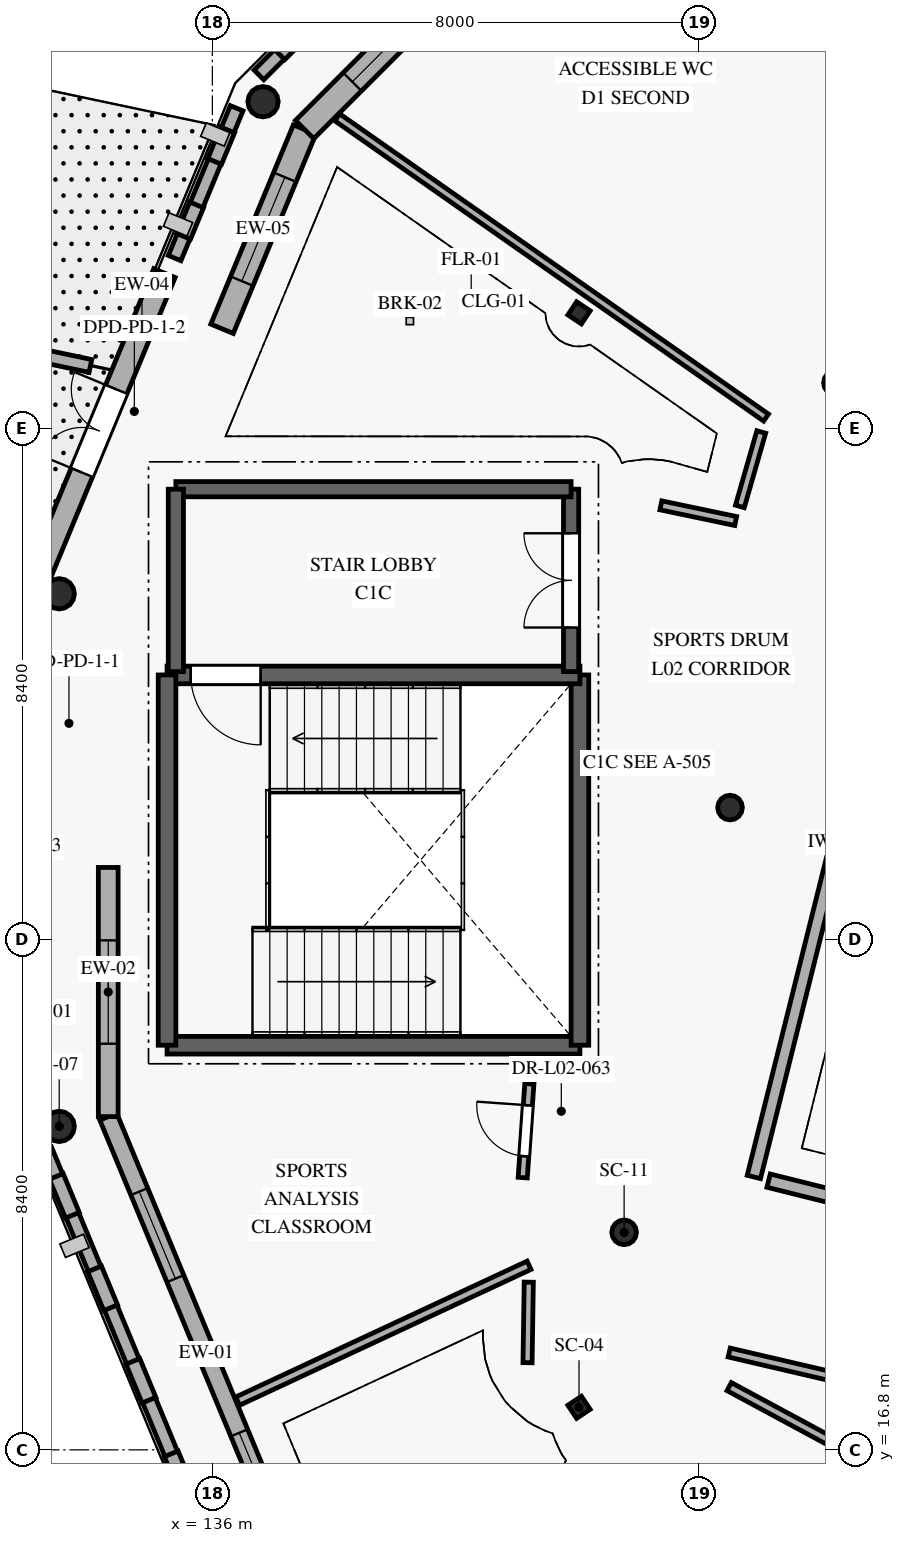
"""IFC4 building model, lengths in metres.
Left out: names, types, materials, properties, quantities, classifications, styles, units other than length and angle.
Written with IfcOpenShell. Run it as: python <this file> out.ifc"""

import sys

from ifc_helpers import new_model, si_unit, direction, frame, frame_2d, origin, origin_2d, place, context, subcontext, project, spatial, rectangle, circle, hollow_circle, i_section, extrude, element, fill, save


model = new_model("IFC4")
c1 = context("Model", 3, precision=1e-05, world=origin(), true_north=direction((0.0, 1.0)))
c2 = subcontext(c1, "Body", "Model", "MODEL_VIEW")
j1 = project(units=[si_unit("LENGTHUNIT", "METRE"), si_unit("PLANEANGLEUNIT", "RADIAN")], contexts=[c1])
p1 = place(None, origin())
s1 = spatial("IfcSite", under=j1, at=p1, CompositionType="ELEMENT")
p2 = place(p1, origin())
s2 = spatial("IfcBuilding", under=s1, at=p2, CompositionType="ELEMENT")
p3 = place(p2, frame((0.0, 0.0, 8.4)))
s3 = spatial("IfcBuildingStorey", under=s2, at=p3, CompositionType="ELEMENT", Elevation=8.4)
for number, where, z_axis, x_axis in (
    (1, (142.772, 20.377, 0.0), (0.0, 0.0, 1.0), (0.97, -0.242, 0.0)),
    (2, (144.514, 27.364, 0.0), (0.0, 0.0, 1.0), (0.97, -0.242, 0.0)),
    (3, (146.256, 34.35, 0.0), (0.0, 0.0, 1.0), (0.97, -0.242, 0.0)),
):
    element("IfcColumn", number, at=place(p3, frame(where, z_axis=z_axis, x_axis=x_axis)), inside=s3, PredefinedType="COLUMN", context=c2, shape_type="SweptSolid", body=[
        extrude(hollow_circle(Radius=0.203, WallThickness=0.016, at=origin_2d()), origin(), (0.0, 0.0, 1.0), 4.2),
    ])
for number, where, z_axis, x_axis in (
    (4, (136.833, 38.973, 0.0), (0.0, 0.0, 1.0), (-0.556, -0.831, 0.0)),
    (5, (133.481, 30.88, 0.0), (0.0, 0.0, 1.0), (-0.195, -0.981, 0.0)),
    (6, (133.481, 22.12, 0.0), (0.0, 0.0, 1.0), (0.195, -0.981, 0.0)),
):
    element("IfcColumn", number, at=place(p3, frame(where, z_axis=z_axis, x_axis=x_axis)), inside=s3, PredefinedType="COLUMN", context=c2, shape_type="SweptSolid", body=[
        extrude(circle(Radius=0.25, at=origin_2d()), origin(), (0.0, 0.0, 1.0), 4.2),
    ])
for number, where, z_axis, x_axis in (
    (7, (142.03, 35.5, 0.0), (0.0, 0.0, 1.0), (-0.556, -0.831, 0.0)),
    (8, (142.03, 17.5, 0.0), (0.0, 0.0, 1.0), (0.556, -0.831, 0.0)),
):
    element("IfcColumn", number, at=place(p3, frame(where, z_axis=z_axis, x_axis=x_axis)), inside=s3, PredefinedType="COLUMN", context=c2, shape_type="SweptSolid", body=[
        extrude(i_section(OverallWidth=0.259, OverallDepth=0.267, WebThickness=0.013, FlangeThickness=0.021, FilletRadius=0.013, at=origin_2d()), origin(), (0.0, 0.0, 1.0), 4.2),
    ])
p4 = place(p3, frame((137.517, 14.484, 0.0), z_axis=(0.0, 0.0, 1.0), x_axis=(-0.382671186453, 0.923884604839, 0.0)))
e9 = element("IfcWall", 9, at=p4, inside=s3, PredefinedType="SOLIDWALL", context=c2, shape_type="SweptSolid", body=[
    extrude(rectangle(XDim=8.439, YDim=0.3, at=frame_2d((4.219, 0.0))), origin(), (0.0, 0.0, 1.0), 3.94),
])
p5 = place(p4, frame((1.41, 0.0, 0.85)))
e10 = element("IfcOpeningElement", 10, at=p5, cuts=e9, PredefinedType="OPENING", context=c2, shape_type="SweptSolid", body=[
    extrude(rectangle(XDim=1.4, YDim=1.4, at=frame_2d((0.7, 0.7))), frame((0.0, 0.16, 0.0), z_axis=(0.0, -1.0, 0.0), x_axis=(1.0, 0.0, 0.0)), (0.0, 0.0, 1.0), 0.32),
])
p6 = place(p4, frame((5.554, 0.0, 0.85)))
e11 = element("IfcOpeningElement", 11, at=p6, cuts=e9, PredefinedType="OPENING", context=c2, shape_type="SweptSolid", body=[
    extrude(rectangle(XDim=1.55, YDim=1.4, at=frame_2d((0.775, 0.7))), frame((0.0, 0.16, 0.0), z_axis=(0.0, -1.0, 0.0), x_axis=(1.0, 0.0, 0.0)), (0.0, 0.0, 1.0), 0.32),
])
p7 = place(p3, frame((134.288, 22.281, 0.0), z_axis=(0.0, 0.0, 1.0), x_axis=(0.0, 1.0, 0.0)))
e12 = element("IfcWall", 12, at=p7, inside=s3, PredefinedType="SOLIDWALL", context=c2, shape_type="SweptSolid", body=[
    extrude(rectangle(XDim=4.098, YDim=0.325, at=frame_2d((2.049, 0.0))), origin(), (0.0, 0.0, 1.0), 3.94),
])
p8 = place(p7, frame((1.199, 0.0, 0.85)))
e13 = element("IfcOpeningElement", 13, at=p8, cuts=e12, PredefinedType="OPENING", context=c2, shape_type="SweptSolid", body=[
    extrude(rectangle(XDim=1.7, YDim=1.4, at=frame_2d((0.85, 0.7))), frame((0.0, 0.172, 0.0), z_axis=(0.0, -1.0, 0.0), x_axis=(1.0, 0.0, 0.0)), (0.0, 0.0, 1.0), 0.345),
])
p9 = place(p3, frame((133.062, 30.963, 0.0), z_axis=(0.0, 0.0, 1.0), x_axis=(0.382652384315, 0.923892392424, 0.0)))
e14 = element("IfcWall", 14, at=p9, inside=s3, PredefinedType="SOLIDWALL", context=c2, shape_type="SweptSolid", body=[
    extrude(rectangle(XDim=5.619, YDim=0.38, at=frame_2d((2.81, 0.0))), origin(), (0.0, 0.0, 1.0), 3.94),
])
p10 = place(p9, frame((2.07, 0.0, 0.0)))
e15 = element("IfcOpeningElement", 15, at=p10, cuts=e14, PredefinedType="OPENING", context=c2, shape_type="SweptSolid", body=[
    extrude(rectangle(XDim=1.48, YDim=2.12, at=frame_2d((0.74, 1.06))), frame((0.0, 0.2, 0.0), z_axis=(0.0, -1.0, 0.0), x_axis=(1.0, 0.0, 0.0)), (0.0, 0.0, 1.0), 0.4),
])
p11 = place(p3, frame((136.16, 35.238, 0.0), z_axis=(0.0, 0.0, 1.0), x_axis=(0.382635436082, 0.923899411762, 0.0)))
e16 = element("IfcWall", 16, at=p11, inside=s3, PredefinedType="SOLIDWALL", context=c2, shape_type="SweptSolid", body=[
    extrude(rectangle(XDim=3.548, YDim=0.4, at=frame_2d((1.774, 0.0))), origin(), (0.0, 0.0, 1.0), 3.94),
])
p12 = place(p11, frame((0.849, 0.0, 0.85)))
e17 = element("IfcOpeningElement", 17, at=p12, cuts=e16, PredefinedType="OPENING", context=c2, shape_type="SweptSolid", body=[
    extrude(rectangle(XDim=1.85, YDim=1.4, at=frame_2d((0.925, 0.7))), frame((0.0, 0.21, 0.0), z_axis=(0.0, -1.0, 0.0), x_axis=(1.0, 0.0, 0.0)), (0.0, 0.0, 1.0), 0.42),
])
p13 = place(p3, frame((137.517, 38.516, 0.0), z_axis=(0.0, 0.0, 1.0), x_axis=(0.707106781187, 0.707106781187, 0.0)))
e18 = element("IfcWall", 18, at=p13, inside=s3, PredefinedType="SOLIDWALL", context=c2, shape_type="SweptSolid", body=[
    extrude(rectangle(XDim=8.439, YDim=0.425, at=frame_2d((4.219, 0.0))), origin(), (0.0, 0.0, 1.0), 3.94),
])
p14 = place(p13, frame((1.11, 0.0, 0.85)))
e19 = element("IfcOpeningElement", 19, at=p14, cuts=e18, PredefinedType="OPENING", context=c2, shape_type="SweptSolid", body=[
    extrude(rectangle(XDim=2.0, YDim=1.4, at=frame_2d((1.0, 0.7))), frame((0.0, 0.222, 0.0), z_axis=(0.0, -1.0, 0.0), x_axis=(1.0, 0.0, 0.0)), (0.0, 0.0, 1.0), 0.445),
])
p15 = place(p13, frame((5.254, 0.0, 0.85)))
e20 = element("IfcOpeningElement", 20, at=p15, cuts=e18, PredefinedType="OPENING", context=c2, shape_type="SweptSolid", body=[
    extrude(rectangle(XDim=2.15, YDim=1.4, at=frame_2d((1.075, 0.7))), frame((0.0, 0.222, 0.0), z_axis=(0.0, -1.0, 0.0), x_axis=(1.0, 0.0, 0.0)), (0.0, 0.0, 1.0), 0.445),
])
p16 = place(p3, frame((142.585, 45.233, 0.0), z_axis=(0.0, 0.0, 1.0), x_axis=(-0.707106781187, -0.707106781187, 0.0)))
e21 = element("IfcWall", 21, at=p16, inside=s3, PredefinedType="ELEMENTEDWALL", context=c2, shape_type="SweptSolid", body=[
    extrude(rectangle(XDim=8.229, YDim=0.225, at=frame_2d((4.115, 0.0))), origin(), (0.0, 0.0, 1.0), 1.09),
])
p17 = place(p3, frame((137.593, 40.24, 1.09), z_axis=(0.0, 0.0, 1.0), x_axis=(-0.707283403329, -0.706930114916, 0.0)))
e22 = element("IfcWall", 22, at=p17, inside=s3, PredefinedType="ELEMENTEDWALL", context=c2, shape_type="SweptSolid", body=[
    extrude(rectangle(XDim=0.691, YDim=0.245, at=frame_2d((0.346, 0.0))), origin(), (0.0, 0.0, 1.0), 2.85),
])
p18 = place(p3, frame((136.4, 38.865, 0.0), z_axis=(0.0, 0.0, 1.0), x_axis=(-0.382691233326, -0.923876301209, 0.0)))
e23 = element("IfcWall", 23, at=p18, inside=s3, PredefinedType="ELEMENTEDWALL", context=c2, shape_type="SweptSolid", body=[
    extrude(rectangle(XDim=2.668, YDim=0.225, at=frame_2d((1.334, 0.0))), origin(), (0.0, 0.0, 1.0), 1.09),
])
p19 = place(p3, frame((136.252, 38.508, 1.09), z_axis=(0.0, 0.0, 1.0), x_axis=(-0.382634050621, -0.923899985553, 0.0)))
e24 = element("IfcWall", 24, at=p19, inside=s3, PredefinedType="ELEMENTEDWALL", context=c2, shape_type="SweptSolid", body=[
    extrude(rectangle(XDim=0.56, YDim=0.245, at=frame_2d((0.28, 0.0))), origin(), (0.0, 0.0, 1.0), 2.85),
])
p20 = place(p3, frame((135.741, 37.276, 1.09), z_axis=(0.0, 0.0, 1.0), x_axis=(-0.382788170111, -0.92383614176, 0.0)))
e25 = element("IfcWall", 25, at=p20, inside=s3, PredefinedType="ELEMENTEDWALL", context=c2, shape_type="SweptSolid", body=[
    extrude(rectangle(XDim=0.56, YDim=0.245, at=frame_2d((0.28, 0.0))), origin(), (0.0, 0.0, 1.0), 2.85),
])
p21 = place(p3, frame((133.251, 21.738, 0.0), z_axis=(0.0, 0.0, 1.0), x_axis=(0.382687155267, -0.923877990426, 0.0)))
e26 = element("IfcWall", 26, at=p21, inside=s3, PredefinedType="ELEMENTEDWALL", context=c2, shape_type="SweptSolid", body=[
    extrude(rectangle(XDim=8.23, YDim=0.225, at=frame_2d((4.115, 0.0))), origin(), (0.0, 0.0, 1.0), 1.09),
])
p22 = place(p3, frame((133.433, 21.297, 1.09), z_axis=(0.0, 0.0, 1.0), x_axis=(0.382934147939, -0.92377564286, 0.0)))
e27 = element("IfcWall", 27, at=p22, inside=s3, PredefinedType="ELEMENTEDWALL", context=c2, shape_type="SweptSolid", body=[
    extrude(rectangle(XDim=0.691, YDim=0.245, at=frame_2d((0.346, 0.0))), origin(), (0.0, 0.0, 1.0), 2.85),
])
p23 = place(p3, frame((134.063, 19.776, 1.09), z_axis=(0.0, 0.0, 1.0), x_axis=(0.382757564877, -0.923848822335, 0.0)))
e28 = element("IfcWall", 28, at=p23, inside=s3, PredefinedType="ELEMENTEDWALL", context=c2, shape_type="SweptSolid", body=[
    extrude(rectangle(XDim=0.691, YDim=0.245, at=frame_2d((0.345, 0.0))), origin(), (0.0, 0.0, 1.0), 2.85),
])
for number, where, z_axis, x_axis in (
    (29, (134.693, 18.255, 1.09), (0.0, 0.0, 1.0), (0.383, -0.924, 0.0)),
    (30, (135.323, 16.735, 1.09), (0.0, 0.0, 1.0), (0.383, -0.924, 0.0)),
):
    element("IfcWall", number, at=place(p3, frame(where, z_axis=z_axis, x_axis=x_axis)), inside=s3, PredefinedType="ELEMENTEDWALL", context=c2, shape_type="SweptSolid", body=[
        extrude(rectangle(XDim=0.691, YDim=0.245, at=frame_2d((0.345, 0.0))), origin(), (0.0, 0.0, 1.0), 2.85),
    ])
p24 = place(p3, frame((133.995, 34.627, 0.0), z_axis=(0.0, 0.0, 1.0), x_axis=(-0.978349703119, 0.206958591044, 0.0)))
e31 = element("IfcWall", 31, at=p24, inside=s3, PredefinedType="PARAPET", context=c2, shape_type="SweptSolid", body=[
    extrude(rectangle(XDim=30.429, YDim=0.215, at=frame_2d((15.215, 0.0))), origin(), (0.0, 0.0, 1.0), 1.15),
])
p25 = place(p3, frame((135.255, 23.455, 0.0), z_axis=(0.0, 0.0, 1.0), x_axis=(1.0, 0.0, 0.0)))
e32 = element("IfcWall", 32, at=p25, inside=s3, PredefinedType="SHEAR", context=c2, shape_type="SweptSolid", body=[
    extrude(rectangle(XDim=6.79, YDim=0.29, at=frame_2d((3.395, 0.0))), origin(), (0.0, 0.0, 1.0), 3.95),
])
p26 = place(p3, frame((142.045, 23.455, 0.0), z_axis=(0.0, 0.0, 1.0), x_axis=(0.0, 1.0, 0.0)))
e33 = element("IfcWall", 33, at=p26, inside=s3, PredefinedType="SHEAR", context=c2, shape_type="SweptSolid", body=[
    extrude(rectangle(XDim=6.09, YDim=0.29, at=frame_2d((3.045, 0.0))), origin(), (0.0, 0.0, 1.0), 3.95),
])
p27 = place(p3, frame((142.045, 29.545, 0.0), z_axis=(0.0, 0.0, 1.0), x_axis=(-1.0, 0.0, 0.0)))
e34 = element("IfcWall", 34, at=p27, inside=s3, PredefinedType="SHEAR", context=c2, shape_type="SweptSolid", body=[
    extrude(rectangle(XDim=6.79, YDim=0.29, at=frame_2d((3.395, 0.0))), origin(), (0.0, 0.0, 1.0), 3.95),
])
p28 = place(p27, frame((5.25, 0.0, 0.0)))
e35 = element("IfcOpeningElement", 35, at=p28, cuts=e34, PredefinedType="OPENING", context=c2, shape_type="SweptSolid", body=[
    extrude(rectangle(XDim=1.15, YDim=2.1, at=frame_2d((0.575, 1.05))), frame((0.0, 0.155, 0.0), z_axis=(0.0, -1.0, 0.0), x_axis=(1.0, 0.0, 0.0)), (0.0, 0.0, 1.0), 0.31),
])
p29 = place(p3, frame((135.255, 29.545, 0.0), z_axis=(0.0, 0.0, 1.0), x_axis=(0.0, -1.0, 0.0)))
e36 = element("IfcWall", 36, at=p29, inside=s3, PredefinedType="SHEAR", context=c2, shape_type="SweptSolid", body=[
    extrude(rectangle(XDim=6.09, YDim=0.29, at=frame_2d((3.045, 0.0))), origin(), (0.0, 0.0, 1.0), 3.95),
])
p30 = place(p3, frame((141.9, 29.6, 0.0), z_axis=(0.0, 0.0, 1.0), x_axis=(0.0, 1.0, 0.0)))
e37 = element("IfcWall", 37, at=p30, inside=s3, PredefinedType="SHEAR", context=c2, shape_type="SweptSolid", body=[
    extrude(rectangle(XDim=3.0, YDim=0.25, at=frame_2d((1.5, 0.0))), origin(), (0.0, 0.0, 1.0), 3.95),
])
p31 = place(p30, frame((0.725, 0.0, 0.0)))
e38 = element("IfcOpeningElement", 38, at=p31, cuts=e37, PredefinedType="OPENING", context=c2, shape_type="SweptSolid", body=[
    extrude(rectangle(XDim=1.55, YDim=2.15, at=frame_2d((0.775, 1.075))), frame((0.0, 0.135, 0.0), z_axis=(0.0, -1.0, 0.0), x_axis=(1.0, 0.0, 0.0)), (0.0, 0.0, 1.0), 0.27),
])
p32 = place(p3, frame((141.9, 32.6, 0.0), z_axis=(0.0, 0.0, 1.0), x_axis=(-1.0, 0.0, 0.0)))
e39 = element("IfcWall", 39, at=p32, inside=s3, PredefinedType="SHEAR", context=c2, shape_type="SweptSolid", body=[
    extrude(rectangle(XDim=6.5, YDim=0.25, at=frame_2d((3.25, 0.0))), origin(), (0.0, 0.0, 1.0), 3.95),
])
p33 = place(p3, frame((135.4, 32.6, 0.0), z_axis=(0.0, 0.0, 1.0), x_axis=(0.0, -1.0, 0.0)))
e40 = element("IfcWall", 40, at=p33, inside=s3, PredefinedType="SHEAR", context=c2, shape_type="SweptSolid", body=[
    extrude(rectangle(XDim=3.0, YDim=0.25, at=frame_2d((1.5, 0.0))), origin(), (0.0, 0.0, 1.0), 3.95),
])
p34 = place(p3, frame((147.652, 32.301, 0.0), z_axis=(0.0, 0.0, 1.0), x_axis=(-0.241928223143, -0.97029414862, 0.0)))
e41 = element("IfcWall", 41, at=p34, inside=s3, PredefinedType="PARTITIONING", context=c2, shape_type="SweptSolid", body=[
    extrude(rectangle(XDim=11.35, YDim=0.225, at=frame_2d((5.675, 0.0))), origin(), (0.0, 0.0, 1.0), 3.95),
])
p35 = place(p3, frame((145.148, 21.228, 0.0), z_axis=(0.0, 0.0, 1.0), x_axis=(0.970296746874, -0.241917802169, 0.0)))
e42 = element("IfcWall", 42, at=p35, inside=s3, PredefinedType="PARTITIONING", context=c2, shape_type="SweptSolid", body=[
    extrude(rectangle(XDim=20.55, YDim=0.225, at=frame_2d((10.275, 0.0))), origin(), (0.0, 0.0, 1.0), 3.95),
])
p36 = place(p3, frame((141.208, 19.836, 0.0), z_axis=(0.0, 0.0, 1.0), x_axis=(-0.906301055213, -0.422632697882, 0.0)))
e43 = element("IfcWall", 43, at=p36, inside=s3, PredefinedType="PARTITIONING", context=c2, shape_type="SweptSolid", body=[
    extrude(rectangle(XDim=5.288, YDim=0.15, at=frame_2d((2.644, 0.0))), origin(), (0.0, 0.0, 1.0), 3.915),
])
p37 = place(p3, frame((149.679, 17.194, 0.0), z_axis=(0.0, 0.0, 1.0), x_axis=(-0.973924106984, 0.226874048396, 0.0)))
e44 = element("IfcWall", 44, at=p37, inside=s3, PredefinedType="PARTITIONING", context=c2, shape_type="SweptSolid", body=[
    extrude(rectangle(XDim=5.318, YDim=0.15, at=frame_2d((2.659, 0.0))), origin(), (0.0, 0.0, 1.0), 3.915),
])
p38 = place(p3, frame((144.5, 17.84, 0.0), z_axis=(0.0, 0.0, 1.0), x_axis=(0.880350401945, -0.474323908101, 0.0)))
e45 = element("IfcWall", 45, at=p38, inside=s3, PredefinedType="PARTITIONING", context=c2, shape_type="SweptSolid", body=[
    extrude(rectangle(XDim=7.471, YDim=0.15, at=frame_2d((3.735, 0.0))), origin(), (0.0, 0.0, 1.0), 3.915),
])
p39 = place(p38, frame((3.216, 0.0, 0.0)))
e46 = element("IfcOpeningElement", 46, at=p39, cuts=e45, PredefinedType="OPENING", context=c2, shape_type="SweptSolid", body=[
    extrude(rectangle(XDim=1.04, YDim=2.1, at=frame_2d((0.52, 1.05))), frame((0.0, 0.085, 0.0), z_axis=(0.0, -1.0, 0.0), x_axis=(1.0, 0.0, 0.0)), (0.0, 0.0, 1.0), 0.17),
])
p40 = place(p3, frame((141.184, 18.234, 0.0), z_axis=(0.0, 0.0, 1.0), x_axis=(0.015300568579, 0.999882939449, 0.0)))
e47 = element("IfcWall", 47, at=p40, inside=s3, PredefinedType="PARTITIONING", context=c2, shape_type="SweptSolid", body=[
    extrude(rectangle(XDim=1.324, YDim=0.15, at=frame_2d((0.662, 0.0))), origin(), (0.0, 0.0, 1.0), 3.915),
])
p41 = place(p3, frame((138.054, 38.716, 0.0), z_axis=(0.0, 0.0, 1.0), x_axis=(0.819154641776, -0.573572726738, 0.0)))
e48 = element("IfcWall", 48, at=p41, inside=s3, PredefinedType="PLUMBINGWALL", context=c2, shape_type="SweptSolid", body=[
    extrude(rectangle(XDim=8.609, YDim=0.14, at=frame_2d((4.305, 0.0))), origin(), (0.0, 0.0, 1.0), 3.915),
])
p42 = place(p3, frame((141.104, 21.278, 0.0), z_axis=(0.0, 0.0, 1.0), x_axis=(0.070730920157, 0.997495432037, 0.0)))
e49 = element("IfcWall", 49, at=p42, inside=s3, PredefinedType="PARTITIONING", context=c2, shape_type="SweptSolid", body=[
    extrude(rectangle(XDim=1.546, YDim=0.15, at=frame_2d((0.773, 0.0))), origin(), (0.0, 0.0, 1.0), 3.915),
])
p43 = place(p42, frame((0.353, 0.0, 0.0)))
e50 = element("IfcOpeningElement", 50, at=p43, cuts=e49, PredefinedType="OPENING", context=c2, shape_type="SweptSolid", body=[
    extrude(rectangle(XDim=0.84, YDim=2.04, at=frame_2d((0.42, 1.02))), frame((0.0, 0.085, 0.0), z_axis=(0.0, -1.0, 0.0), x_axis=(1.0, 0.0, 0.0)), (0.0, 0.0, 1.0), 0.17),
])
p44 = place(p3, frame((143.376, 32.334, 0.0), z_axis=(0.0, 0.0, 1.0), x_axis=(0.978708141887, -0.205256846424, 0.0)))
e51 = element("IfcWall", 51, at=p44, inside=s3, PredefinedType="PARTITIONING", context=c2, shape_type="SweptSolid", body=[
    extrude(rectangle(XDim=1.257, YDim=0.15, at=frame_2d((0.629, 0.0))), origin(), (0.0, 0.0, 1.0), 3.915),
])
p45 = place(p3, frame((144.676, 32.316, 0.0), z_axis=(0.0, 0.0, 1.0), x_axis=(0.275986551493, 0.961161497041, 0.0)))
e52 = element("IfcWall", 52, at=p45, inside=s3, PredefinedType="PARTITIONING", context=c2, shape_type="SweptSolid", body=[
    extrude(rectangle(XDim=1.274, YDim=0.15, at=frame_2d((0.637, 0.0))), origin(), (0.0, 0.0, 1.0), 3.915),
])
p46 = place(p10, origin())
e53 = element("IfcDoor", 53, at=p46, inside=s3, OperationType="DOUBLE_DOOR_SINGLE_SWING", PredefinedType="DOOR", context=c2, shape_type="SweptSolid", body=[
    extrude(rectangle(XDim=1.48, YDim=2.12, at=frame_2d((0.74, 1.06))), frame((0.0, 0.025, 0.0), z_axis=(0.0, -1.0, 0.0), x_axis=(1.0, 0.0, 0.0)), (0.0, 0.0, 1.0), 0.05),
])
fill(e15, e53)
p47 = place(p5, origin())
e54 = element("IfcWindow", 54, at=p47, inside=s3, PartitioningType="SINGLE_PANEL", PredefinedType="WINDOW", context=c2, shape_type="SweptSolid", body=[
    extrude(rectangle(XDim=1.4, YDim=1.4, at=frame_2d((0.7, 0.7))), frame((0.0, 0.03, 0.0), z_axis=(0.0, -1.0, 0.0), x_axis=(1.0, 0.0, 0.0)), (0.0, 0.0, 1.0), 0.06),
])
fill(e10, e54)
p48 = place(p6, origin())
e55 = element("IfcWindow", 55, at=p48, inside=s3, PartitioningType="SINGLE_PANEL", PredefinedType="WINDOW", context=c2, shape_type="SweptSolid", body=[
    extrude(rectangle(XDim=1.55, YDim=1.4, at=frame_2d((0.775, 0.7))), frame((0.0, 0.03, 0.0), z_axis=(0.0, -1.0, 0.0), x_axis=(1.0, 0.0, 0.0)), (0.0, 0.0, 1.0), 0.06),
])
fill(e11, e55)
p49 = place(p8, origin())
e56 = element("IfcWindow", 56, at=p49, inside=s3, PartitioningType="SINGLE_PANEL", PredefinedType="WINDOW", context=c2, shape_type="SweptSolid", body=[
    extrude(rectangle(XDim=1.7, YDim=1.4, at=frame_2d((0.85, 0.7))), frame((0.0, 0.03, 0.0), z_axis=(0.0, -1.0, 0.0), x_axis=(1.0, 0.0, 0.0)), (0.0, 0.0, 1.0), 0.06),
])
fill(e13, e56)
p50 = place(p12, origin())
e57 = element("IfcWindow", 57, at=p50, inside=s3, PartitioningType="SINGLE_PANEL", PredefinedType="WINDOW", context=c2, shape_type="SweptSolid", body=[
    extrude(rectangle(XDim=1.85, YDim=1.4, at=frame_2d((0.925, 0.7))), frame((0.0, 0.03, 0.0), z_axis=(0.0, -1.0, 0.0), x_axis=(1.0, 0.0, 0.0)), (0.0, 0.0, 1.0), 0.06),
])
fill(e17, e57)
p51 = place(p14, origin())
e58 = element("IfcWindow", 58, at=p51, inside=s3, PartitioningType="SINGLE_PANEL", PredefinedType="WINDOW", context=c2, shape_type="SweptSolid", body=[
    extrude(rectangle(XDim=2.0, YDim=1.4, at=frame_2d((1.0, 0.7))), frame((0.0, 0.03, 0.0), z_axis=(0.0, -1.0, 0.0), x_axis=(1.0, 0.0, 0.0)), (0.0, 0.0, 1.0), 0.06),
])
fill(e19, e58)
p52 = place(p28, origin())
e59 = element("IfcDoor", 59, at=p52, inside=s3, OperationType="SINGLE_SWING_LEFT", PredefinedType="DOOR", context=c2, shape_type="SweptSolid", body=[
    extrude(rectangle(XDim=1.15, YDim=2.1, at=frame_2d((0.575, 1.05))), frame((0.0, 0.025, 0.0), z_axis=(0.0, -1.0, 0.0), x_axis=(1.0, 0.0, 0.0)), (0.0, 0.0, 1.0), 0.05),
])
fill(e35, e59)
p53 = place(p31, origin())
e60 = element("IfcDoor", 60, at=p53, inside=s3, OperationType="DOUBLE_DOOR_SINGLE_SWING", PredefinedType="DOOR", context=c2, shape_type="SweptSolid", body=[
    extrude(rectangle(XDim=1.55, YDim=2.15, at=frame_2d((0.775, 1.075))), frame((0.0, 0.025, 0.0), z_axis=(0.0, -1.0, 0.0), x_axis=(1.0, 0.0, 0.0)), (0.0, 0.0, 1.0), 0.05),
])
fill(e38, e60)
p54 = place(p43, origin())
e61 = element("IfcDoor", 61, at=p54, inside=s3, OperationType="SINGLE_SWING_RIGHT", PredefinedType="DOOR", context=c2, shape_type="SweptSolid", body=[
    extrude(rectangle(XDim=0.84, YDim=2.04, at=frame_2d((0.42, 1.02))), frame((0.0, 0.025, 0.0), z_axis=(0.0, -1.0, 0.0), x_axis=(1.0, 0.0, 0.0)), (0.0, 0.0, 1.0), 0.05),
])
fill(e50, e61)
save(model, sys.argv[1])
